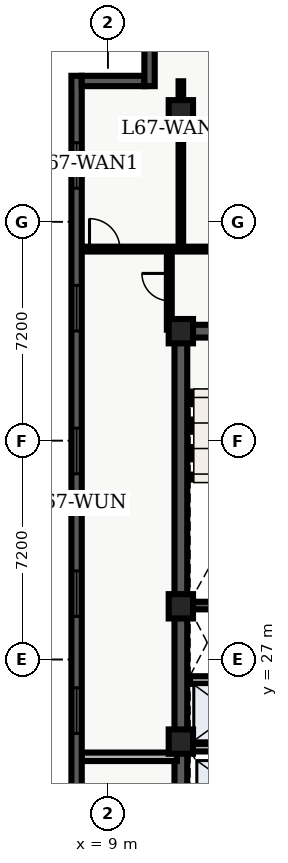
"""IFC4 building model, lengths in metres.
Left out: names, types, materials, properties, quantities, classifications, styles, units other than length and angle.
Written with IfcOpenShell. Run it as: python <this file> out.ifc"""

import sys

from ifc_helpers import new_model, entity, si_unit, converted_unit, direction, frame, origin_with_axes, origin_2d_with_axis, place, context, subcontext, project, spatial, polyline, rectangle, outline, extrude, element, fill, save


model = new_model("IFC4")
c1 = context("Model", 3, precision=1e-05, world=origin_with_axes(), true_north=direction((0.0, 1.0)))
c2 = subcontext(c1, "Body", "Model", "MODEL_VIEW")
j1 = project(units=[si_unit("LENGTHUNIT", "METRE"), converted_unit("PLANEANGLEUNIT", "DEGREE", entity("IfcPlaneAngleMeasure", 0.017), si_unit("PLANEANGLEUNIT", "RADIAN"), dimensions=[0, 0, 0, 0, 0, 0, 0])], contexts=[c1])
p1 = place(None, origin_with_axes())
s1 = spatial("IfcSite", under=j1, at=p1, CompositionType="ELEMENT")
p2 = place(p1, origin_with_axes())
s2 = spatial("IfcBuilding", under=s1, at=p2, CompositionType="ELEMENT")
p3 = place(p2, frame((0.0, 0.0, 272.4), z_axis=(0.0, 0.0, 1.0), x_axis=(1.0, 0.0, 0.0)))
s3 = spatial("IfcBuildingStorey", under=s2, at=p3, CompositionType="ELEMENT", Elevation=272.4)
p4 = place(p3, frame((11.4, 10.8, 0.0), z_axis=(0.0, 0.0, 1.0), x_axis=(0.0, 1.0, 0.0)))
e1 = element("IfcWall", 1, at=p4, inside=s3, PredefinedType="SHEAR", context=c2, shape_type="SweptSolid", body=[
    extrude(outline(polyline([(0.0, -0.21), (27.0, -0.21), (27.0, 0.21), (0.0, 0.21), (0.0, -0.21)])), origin_with_axes(), (0.0, 0.0, 1.0), 3.66),
])
p5 = place(p3, frame((11.4, 37.8, 0.0), z_axis=(0.0, 0.0, 1.0), x_axis=(1.0, 0.0, 0.0)))
e2 = element("IfcWall", 2, at=p5, inside=s3, PredefinedType="SHEAR", context=c2, shape_type="SweptSolid", body=[
    extrude(outline(polyline([(0.0, -0.21), (7.2, -0.21), (7.2, 0.21), (0.0, 0.21), (0.0, -0.21)])), origin_with_axes(), (0.0, 0.0, 1.0), 3.66),
])
p6 = place(p5, frame((2.625, 0.0, 0.0), z_axis=(0.0, 0.0, 1.0), x_axis=(1.0, 0.0, 0.0)))
e3 = element("IfcOpeningElement", 3, at=p6, cuts=e2, PredefinedType="OPENING", context=c2, shape_type="SweptSolid", body=[
    extrude(rectangle(XDim=1.05, YDim=0.44, at=origin_2d_with_axis()), origin_with_axes(), (0.0, 0.0, 1.0), 2.15),
])
p7 = place(p3, frame((11.61, 28.775, 0.0), z_axis=(0.0, 0.0, 1.0), x_axis=(1.0, 0.0, 0.0)))
e4 = element("IfcWall", 4, at=p7, inside=s3, PredefinedType="SHEAR", context=c2, shape_type="SweptSolid", body=[
    extrude(outline(polyline([(0.0, -0.125), (6.78, -0.125), (6.78, 0.125), (0.0, 0.125), (0.0, -0.125)])), origin_with_axes(), (0.0, 0.0, 1.0), 3.66),
])
p8 = place(p3, frame((11.7, 24.1, 0.0), z_axis=(0.0, 0.0, 1.0), x_axis=(1.0, 0.0, 0.0)))
e5 = element("IfcWall", 5, at=p8, inside=s3, PredefinedType="SOLIDWALL", context=c2, shape_type="SweptSolid", body=[
    extrude(outline(polyline([(0.0, -0.125), (6.6, -0.125), (6.6, 0.125), (0.0, 0.125), (0.0, -0.125)])), origin_with_axes(), (0.0, 0.0, 1.0), 2.7),
])
p9 = place(p8, frame((3.6, 0.0, 0.0), z_axis=(0.0, 0.0, 1.0), x_axis=(1.0, 0.0, 0.0)))
e6 = element("IfcOpeningElement", 6, at=p9, cuts=e5, PredefinedType="OPENING", context=c2, shape_type="SweptSolid", body=[
    extrude(rectangle(XDim=0.9, YDim=0.27, at=origin_2d_with_axis()), origin_with_axes(), (0.0, 0.0, 1.0), 2.15),
])
p10 = place(p8, frame((5.65, 0.0, 0.0), z_axis=(0.0, 0.0, 1.0), x_axis=(1.0, 0.0, 0.0)))
e7 = element("IfcOpeningElement", 7, at=p10, cuts=e5, PredefinedType="OPENING", context=c2, shape_type="SweptSolid", body=[
    extrude(rectangle(XDim=0.9, YDim=0.27, at=origin_2d_with_axis()), origin_with_axes(), (0.0, 0.0, 1.0), 2.15),
])
p11 = place(p3, frame((11.7, 26.325, 0.0), z_axis=(0.0, 0.0, 1.0), x_axis=(1.0, 0.0, 0.0)))
e8 = element("IfcWall", 8, at=p11, inside=s3, PredefinedType="SOLIDWALL", context=c2, shape_type="SweptSolid", body=[
    extrude(outline(polyline([(0.0, -0.125), (6.6, -0.125), (6.6, 0.125), (0.0, 0.125), (0.0, -0.125)])), origin_with_axes(), (0.0, 0.0, 1.0), 2.7),
])
p12 = place(p11, frame((3.5, 0.0, 0.0), z_axis=(0.0, 0.0, 1.0), x_axis=(1.0, 0.0, 0.0)))
e9 = element("IfcOpeningElement", 9, at=p12, cuts=e8, PredefinedType="OPENING", context=c2, shape_type="SweptSolid", body=[
    extrude(rectangle(XDim=0.9, YDim=0.27, at=origin_2d_with_axis()), origin_with_axes(), (0.0, 0.0, 1.0), 2.15),
])
for number, where, z_axis, x_axis in (
    (10, (11.4, 24.3, 0.0), (0.0, 0.0, 1.0), (1.0, 0.0, 0.0)),
    (11, (11.4, 28.75, 0.0), (0.0, 0.0, 1.0), (1.0, 0.0, 0.0)),
    (12, (11.4, 37.8, 0.0), (0.0, 0.0, 1.0), (1.0, 0.0, 0.0)),
    (13, (11.4, 45.0, 0.0), (0.0, 0.0, 1.0), (1.0, 0.0, 0.0)),
):
    element("IfcColumn", number, at=place(p3, frame(where, z_axis=z_axis, x_axis=x_axis)), inside=s3, PredefinedType="COLUMN", context=c2, shape_type="SweptSolid", body=[
        extrude(rectangle(XDim=0.8, YDim=0.8, at=origin_2d_with_axis()), origin_with_axes(), (0.0, 0.0, 1.0), 3.9),
    ])
p13 = place(p3, frame((8.135, 40.5, 0.0), z_axis=(0.0, 0.0, 1.0), x_axis=(1.0, 0.0, 0.0)))
e14 = element("IfcWall", 14, at=p13, inside=s3, PredefinedType="PARTITIONING", context=c2, shape_type="SweptSolid", body=[
    extrude(outline(polyline([(0.0, -0.08), (23.93, -0.08), (23.93, 0.08), (0.0, 0.08), (0.0, -0.08)])), origin_with_axes(), (0.0, 0.0, 1.0), 2.7),
])
p14 = place(p13, frame((0.76, 0.0, 0.0), z_axis=(0.0, 0.0, 1.0), x_axis=(1.0, 0.0, 0.0)))
e15 = element("IfcOpeningElement", 15, at=p14, cuts=e14, PredefinedType="OPENING", context=c2, shape_type="SweptSolid", body=[
    extrude(rectangle(XDim=1.0, YDim=0.18, at=origin_2d_with_axis()), origin_with_axes(), (0.0, 0.0, 1.0), 2.15),
])
p15 = place(p13, frame((4.729, 0.0, 0.0), z_axis=(0.0, 0.0, 1.0), x_axis=(1.0, 0.0, 0.0)))
e16 = element("IfcOpeningElement", 16, at=p15, cuts=e14, PredefinedType="OPENING", context=c2, shape_type="SweptSolid", body=[
    extrude(rectangle(XDim=1.0, YDim=0.18, at=origin_2d_with_axis()), origin_with_axes(), (0.0, 0.0, 1.0), 2.15),
])
p16 = place(p13, frame((7.574, 0.0, 0.0), z_axis=(0.0, 0.0, 1.0), x_axis=(1.0, 0.0, 0.0)))
e17 = element("IfcOpeningElement", 17, at=p16, cuts=e14, PredefinedType="OPENING", context=c2, shape_type="SweptSolid", body=[
    extrude(rectangle(XDim=1.0, YDim=0.18, at=origin_2d_with_axis()), origin_with_axes(), (0.0, 0.0, 1.0), 2.15),
])
p17 = place(p13, frame((10.189, 0.0, 0.0), z_axis=(0.0, 0.0, 1.0), x_axis=(1.0, 0.0, 0.0)))
e18 = element("IfcOpeningElement", 18, at=p17, cuts=e14, PredefinedType="OPENING", context=c2, shape_type="SweptSolid", body=[
    extrude(rectangle(XDim=1.0, YDim=0.18, at=origin_2d_with_axis()), origin_with_axes(), (0.0, 0.0, 1.0), 2.15),
])
p18 = place(p3, frame((11.02, 37.85, 0.0), z_axis=(0.0, 0.0, 1.0), x_axis=(0.0, 1.0, 0.0)))
e19 = element("IfcWall", 19, at=p18, inside=s3, PredefinedType="PARTITIONING", context=c2, shape_type="SweptSolid", body=[
    extrude(outline(polyline([(0.0, -0.08), (2.65, -0.08), (2.65, 0.08), (0.0, 0.08), (0.0, -0.08)])), origin_with_axes(), (0.0, 0.0, 1.0), 2.7),
])
p19 = place(p18, frame((1.4, 0.0, 0.0), z_axis=(0.0, 0.0, 1.0), x_axis=(1.0, 0.0, 0.0)))
e20 = element("IfcOpeningElement", 20, at=p19, cuts=e19, PredefinedType="OPENING", context=c2, shape_type="SweptSolid", body=[
    extrude(rectangle(XDim=0.9, YDim=0.18, at=origin_2d_with_axis()), origin_with_axes(), (0.0, 0.0, 1.0), 2.15),
])
p20 = place(p3, frame((8.135, 23.8, 0.0), z_axis=(0.0, 0.0, 1.0), x_axis=(1.0, 0.0, 0.0)))
e21 = element("IfcWall", 21, at=p20, inside=s3, PredefinedType="PARTITIONING", context=c2, shape_type="SweptSolid", body=[
    extrude(outline(polyline([(0.0, -0.14), (3.135, -0.14), (3.135, 0.14), (0.0, 0.14), (0.0, -0.14)])), origin_with_axes(), (0.0, 0.0, 1.0), 2.7),
])
p21 = place(p3, frame((11.4, 40.6, 0.0), z_axis=(0.0, 0.0, 1.0), x_axis=(0.0, 1.0, 0.0)))
e22 = element("IfcWall", 22, at=p21, inside=s3, PredefinedType="PARTITIONING", context=c2, shape_type="SweptSolid", body=[
    extrude(outline(polyline([(0.0, -0.075), (5.42, -0.075), (5.42, 0.075), (0.0, 0.075), (0.0, -0.075)])), origin_with_axes(), (0.0, 0.0, 1.0), 2.7),
])
p22 = place(p3, frame((7.97, 2.74, 0.0), z_axis=(0.0, 0.0, 1.0), x_axis=(0.0, 1.0, 0.0)))
e23 = element("IfcWall", 23, at=p22, inside=s3, PredefinedType="SOLIDWALL", context=c2, shape_type="SweptSolid", body=[
    extrude(outline(polyline([(0.0, -0.17), (43.46, -0.17), (43.46, 0.17), (0.0, 0.17), (0.0, -0.17)])), origin_with_axes(), (0.0, 0.0, 1.0), 3.66),
])
p23 = place(p22, frame((2.948, 0.0, 0.45), z_axis=(0.0, 0.0, 1.0), x_axis=(1.0, 0.0, 0.0)))
e24 = element("IfcOpeningElement", 24, at=p23, cuts=e23, PredefinedType="OPENING", context=c2, shape_type="SweptSolid", body=[
    extrude(rectangle(XDim=1.5, YDim=0.36, at=origin_2d_with_axis()), origin_with_axes(), (0.0, 0.0, 1.0), 2.1),
])
p24 = place(p22, frame((7.643, 0.0, 0.45), z_axis=(0.0, 0.0, 1.0), x_axis=(1.0, 0.0, 0.0)))
e25 = element("IfcOpeningElement", 25, at=p24, cuts=e23, PredefinedType="OPENING", context=c2, shape_type="SweptSolid", body=[
    extrude(rectangle(XDim=1.5, YDim=0.36, at=origin_2d_with_axis()), origin_with_axes(), (0.0, 0.0, 1.0), 2.1),
])
p25 = place(p22, frame((12.339, 0.0, 0.45), z_axis=(0.0, 0.0, 1.0), x_axis=(1.0, 0.0, 0.0)))
e26 = element("IfcOpeningElement", 26, at=p25, cuts=e23, PredefinedType="OPENING", context=c2, shape_type="SweptSolid", body=[
    extrude(rectangle(XDim=1.5, YDim=0.36, at=origin_2d_with_axis()), origin_with_axes(), (0.0, 0.0, 1.0), 2.1),
])
p26 = place(p22, frame((17.034, 0.0, 0.45), z_axis=(0.0, 0.0, 1.0), x_axis=(1.0, 0.0, 0.0)))
e27 = element("IfcOpeningElement", 27, at=p26, cuts=e23, PredefinedType="OPENING", context=c2, shape_type="SweptSolid", body=[
    extrude(rectangle(XDim=1.5, YDim=0.36, at=origin_2d_with_axis()), origin_with_axes(), (0.0, 0.0, 1.0), 2.1),
])
p27 = place(p22, frame((22.58, 0.0, 0.45), z_axis=(0.0, 0.0, 1.0), x_axis=(1.0, 0.0, 0.0)))
e28 = element("IfcOpeningElement", 28, at=p27, cuts=e23, PredefinedType="OPENING", context=c2, shape_type="SweptSolid", body=[
    extrude(rectangle(XDim=1.5, YDim=0.36, at=origin_2d_with_axis()), origin_with_axes(), (0.0, 0.0, 1.0), 2.1),
])
p28 = place(p22, frame((26.426, 0.0, 0.45), z_axis=(0.0, 0.0, 1.0), x_axis=(1.0, 0.0, 0.0)))
e29 = element("IfcOpeningElement", 29, at=p28, cuts=e23, PredefinedType="OPENING", context=c2, shape_type="SweptSolid", body=[
    extrude(rectangle(XDim=1.5, YDim=0.36, at=origin_2d_with_axis()), origin_with_axes(), (0.0, 0.0, 1.0), 2.1),
])
p29 = place(p22, frame((31.121, 0.0, 0.45), z_axis=(0.0, 0.0, 1.0), x_axis=(1.0, 0.0, 0.0)))
e30 = element("IfcOpeningElement", 30, at=p29, cuts=e23, PredefinedType="OPENING", context=c2, shape_type="SweptSolid", body=[
    extrude(rectangle(XDim=1.5, YDim=0.36, at=origin_2d_with_axis()), origin_with_axes(), (0.0, 0.0, 1.0), 2.1),
])
p30 = place(p22, frame((35.817, 0.0, 0.45), z_axis=(0.0, 0.0, 1.0), x_axis=(1.0, 0.0, 0.0)))
e31 = element("IfcOpeningElement", 31, at=p30, cuts=e23, PredefinedType="OPENING", context=c2, shape_type="SweptSolid", body=[
    extrude(rectangle(XDim=1.5, YDim=0.36, at=origin_2d_with_axis()), origin_with_axes(), (0.0, 0.0, 1.0), 2.1),
])
p31 = place(p22, frame((40.512, 0.0, 0.45), z_axis=(0.0, 0.0, 1.0), x_axis=(1.0, 0.0, 0.0)))
e32 = element("IfcOpeningElement", 32, at=p31, cuts=e23, PredefinedType="OPENING", context=c2, shape_type="SweptSolid", body=[
    extrude(rectangle(XDim=1.5, YDim=0.36, at=origin_2d_with_axis()), origin_with_axes(), (0.0, 0.0, 1.0), 2.1),
])
p32 = place(p3, frame((8.14, 46.03, 0.0), z_axis=(0.0, 0.0, 1.0), x_axis=(1.0, 0.0, 0.0)))
e33 = element("IfcWall", 33, at=p32, inside=s3, PredefinedType="SOLIDWALL", context=c2, shape_type="SweptSolid", body=[
    extrude(outline(polyline([(0.0, -0.17), (2.06, -0.17), (2.06, 0.17), (0.0, 0.17), (0.0, -0.17)])), origin_with_axes(), (0.0, 0.0, 1.0), 3.66),
])
p33 = place(p3, frame((10.37, 45.86, 0.0), z_axis=(0.0, 0.0, 1.0), x_axis=(0.0, 1.0, 0.0)))
e34 = element("IfcWall", 34, at=p33, inside=s3, PredefinedType="SOLIDWALL", context=c2, shape_type="SweptSolid", body=[
    extrude(outline(polyline([(0.0, -0.17), (2.74, -0.17), (2.74, 0.17), (0.0, 0.17), (0.0, -0.17)])), origin_with_axes(), (0.0, 0.0, 1.0), 3.66),
])
p34 = place(p18, frame((1.4, 0.0, 0.0), z_axis=(0.0, 0.0, 1.0), x_axis=(1.0, 0.0, 0.0)))
e35 = element("IfcDoor", 35, at=p34, inside=s3, OperationType="SINGLE_SWING_RIGHT", PredefinedType="DOOR", context=c2, shape_type="SweptSolid", body=[
    extrude(rectangle(XDim=0.9, YDim=0.09, at=origin_2d_with_axis()), origin_with_axes(), (0.0, 0.0, 1.0), 2.15),
])
fill(e20, e35)
p35 = place(p13, frame((0.76, 0.0, 0.0), z_axis=(0.0, 0.0, 1.0), x_axis=(1.0, 0.0, 0.0)))
e36 = element("IfcDoor", 36, at=p35, inside=s3, OperationType="SINGLE_SWING_LEFT", PredefinedType="DOOR", context=c2, shape_type="SweptSolid", body=[
    extrude(rectangle(XDim=1.0, YDim=0.09, at=origin_2d_with_axis()), origin_with_axes(), (0.0, 0.0, 1.0), 2.15),
])
fill(e15, e36)
p36 = place(p22, frame((22.58, 0.0, 0.45), z_axis=(0.0, 0.0, 1.0), x_axis=(1.0, 0.0, 0.0)))
e37 = element("IfcWindow", 37, at=p36, inside=s3, PredefinedType="WINDOW", context=c2, shape_type="SweptSolid", body=[
    extrude(rectangle(XDim=1.5, YDim=0.09, at=origin_2d_with_axis()), origin_with_axes(), (0.0, 0.0, 1.0), 2.1),
])
fill(e28, e37)
p37 = place(p22, frame((26.426, 0.0, 0.45), z_axis=(0.0, 0.0, 1.0), x_axis=(1.0, 0.0, 0.0)))
e38 = element("IfcWindow", 38, at=p37, inside=s3, PredefinedType="WINDOW", context=c2, shape_type="SweptSolid", body=[
    extrude(rectangle(XDim=1.5, YDim=0.09, at=origin_2d_with_axis()), origin_with_axes(), (0.0, 0.0, 1.0), 2.1),
])
fill(e29, e38)
p38 = place(p22, frame((31.121, 0.0, 0.45), z_axis=(0.0, 0.0, 1.0), x_axis=(1.0, 0.0, 0.0)))
e39 = element("IfcWindow", 39, at=p38, inside=s3, PredefinedType="WINDOW", context=c2, shape_type="SweptSolid", body=[
    extrude(rectangle(XDim=1.5, YDim=0.09, at=origin_2d_with_axis()), origin_with_axes(), (0.0, 0.0, 1.0), 2.1),
])
fill(e30, e39)
p39 = place(p22, frame((35.817, 0.0, 0.45), z_axis=(0.0, 0.0, 1.0), x_axis=(1.0, 0.0, 0.0)))
e40 = element("IfcWindow", 40, at=p39, inside=s3, PredefinedType="WINDOW", context=c2, shape_type="SweptSolid", body=[
    extrude(rectangle(XDim=1.5, YDim=0.09, at=origin_2d_with_axis()), origin_with_axes(), (0.0, 0.0, 1.0), 2.1),
])
fill(e31, e40)
p40 = place(p22, frame((40.512, 0.0, 0.45), z_axis=(0.0, 0.0, 1.0), x_axis=(1.0, 0.0, 0.0)))
e41 = element("IfcWindow", 41, at=p40, inside=s3, PredefinedType="WINDOW", context=c2, shape_type="SweptSolid", body=[
    extrude(rectangle(XDim=1.5, YDim=0.09, at=origin_2d_with_axis()), origin_with_axes(), (0.0, 0.0, 1.0), 2.1),
])
fill(e32, e41)
save(model, sys.argv[1])
